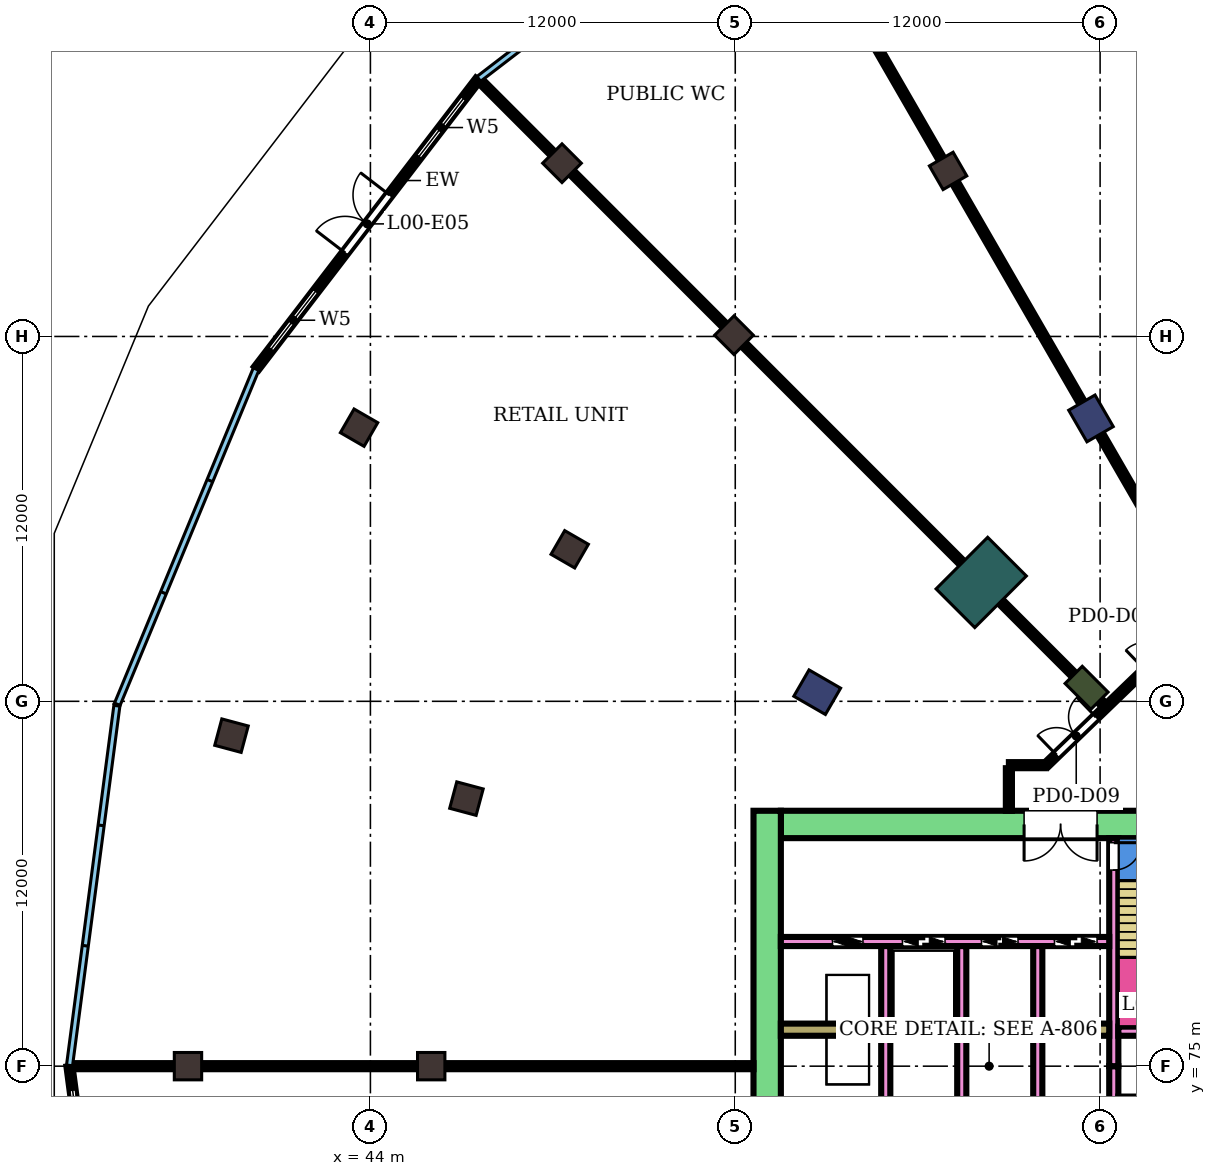
"""IFC4 building model, lengths in metres.
Left out: names, types, materials, properties, quantities, classifications, styles, units other than length and angle.
Written with IfcOpenShell. Run it as: python <this file> out.ifc"""

import sys

from ifc_helpers import new_model, si_unit, direction, frame, frame_2d, origin, origin_2d, place, context, subcontext, project, spatial, rectangle, extrude, element, fill, save


model = new_model("IFC4")
c1 = context("Model", 3, precision=1e-05, world=origin(), true_north=direction((0.0, 1.0)))
c2 = subcontext(c1, "Body", "Model", "MODEL_VIEW")
j1 = project(units=[si_unit("LENGTHUNIT", "METRE"), si_unit("PLANEANGLEUNIT", "RADIAN")], contexts=[c1])
p1 = place(None, origin())
s1 = spatial("IfcSite", under=j1, at=p1, CompositionType="ELEMENT")
p2 = place(p1, origin())
s2 = spatial("IfcBuilding", under=s1, at=p2, CompositionType="ELEMENT")
p3 = place(p2, origin())
s3 = spatial("IfcBuildingStorey", under=s2, at=p3, CompositionType="ELEMENT", Elevation=0.0)
for number, where, z_axis, x_axis in (
    (1, (50.302, 104.698, 0.0), (0.0, 0.0, 1.0), (-0.707, 0.707, 0.0)),
    (2, (43.627, 96.0, 0.0), (0.0, 0.0, 1.0), (-0.866, 0.5, 0.0)),
    (3, (39.431, 85.87, 0.0), (0.0, 0.0, 1.0), (-0.966, 0.259, 0.0)),
    (4, (38.0, 75.0, 0.0), (0.0, 0.0, 1.0), (-1.0, 0.0, 0.0)),
    (5, (63.0, 104.445, 0.0), (0.0, 0.0, 1.0), (-0.5, 0.866, 0.0)),
    (6, (55.958, 99.042, 0.0), (0.0, 0.0, 1.0), (-0.707, 0.707, 0.0)),
    (7, (50.555, 92.0, 0.0), (0.0, 0.0, 1.0), (-0.866, 0.5, 0.0)),
    (8, (47.158, 83.8, 0.0), (0.0, 0.0, 1.0), (-0.966, 0.259, 0.0)),
    (9, (46.0, 75.0, 0.0), (0.0, 0.0, 1.0), (-1.0, 0.0, 0.0)),
):
    element("IfcColumn", number, at=place(p3, frame(where, z_axis=z_axis, x_axis=x_axis)), inside=s3, PredefinedType="COLUMN", context=c2, shape_type="SweptSolid", body=[
        extrude(rectangle(XDim=0.9, YDim=0.9, at=origin_2d()), origin(), (0.0, 0.0, 1.0), 7.0),
    ])
for number, where, z_axis, x_axis in (
    (10, (67.7, 96.304, 0.0), (0.0, 0.0, 1.0), (-0.5, 0.866, 0.0)),
    (11, (58.696, 87.3, 0.0), (0.0, 0.0, 1.0), (-0.866, 0.5, 0.0)),
):
    element("IfcColumn", number, at=place(p3, frame(where, z_axis=z_axis, x_axis=x_axis)), inside=s3, PredefinedType="COLUMN", context=c2, shape_type="SweptSolid", body=[
        extrude(rectangle(XDim=1.2, YDim=1.0, at=origin_2d()), origin(), (0.0, 0.0, 1.0), 7.0),
    ])
p4 = place(p3, frame((67.555, 87.445, 0.0), z_axis=(0.0, 0.0, 1.0), x_axis=(-0.707106781187, 0.707106781187, 0.0)))
e12 = element("IfcColumn", 12, at=p4, inside=s3, PredefinedType="COLUMN", context=c2, shape_type="SweptSolid", body=[
    extrude(rectangle(XDim=1.2, YDim=0.8, at=origin_2d()), origin(), (0.0, 0.0, 1.0), 7.0),
])
p5 = place(p3, frame((64.09, 90.91, 0.0), z_axis=(0.0, 0.0, 1.0), x_axis=(-0.707106781187, 0.707106781187, 0.0)))
e13 = element("IfcColumn", 13, at=p5, inside=s3, PredefinedType="COLUMN", context=c2, shape_type="SweptSolid", body=[
    extrude(rectangle(XDim=1.8, YDim=2.4, at=origin_2d()), origin(), (0.0, 0.0, 1.0), 7.0),
])
p6 = place(p3, frame((72.1, 82.95, 0.0), z_axis=(0.0, 0.0, 1.0), x_axis=(-1.0, 0.0, 0.0)))
e14 = element("IfcWall", 14, at=p6, inside=s3, PredefinedType="SHEAR", context=c2, shape_type="SweptSolid", body=[
    extrude(rectangle(XDim=14.6, YDim=0.9, at=frame_2d((7.3, 0.0))), origin(), (0.0, 0.0, 1.0), 6.55),
])
p7 = place(p6, frame((4.2, 0.0, 0.0)))
e15 = element("IfcOpeningElement", 15, at=p7, cuts=e14, PredefinedType="OPENING", context=c2, shape_type="SweptSolid", body=[
    extrude(rectangle(XDim=2.4, YDim=2.4, at=frame_2d((1.2, 1.2))), frame((0.0, 0.46, 0.0), z_axis=(0.0, -1.0, 0.0), x_axis=(1.0, 0.0, 0.0)), (0.0, 0.0, 1.0), 0.92),
])
p8 = place(p3, frame((57.05, 83.4, 0.0), z_axis=(0.0, 0.0, 1.0), x_axis=(0.0, -1.0, 0.0)))
e16 = element("IfcWall", 16, at=p8, inside=s3, PredefinedType="SHEAR", context=c2, shape_type="SweptSolid", body=[
    extrude(rectangle(XDim=16.8, YDim=0.9, at=frame_2d((8.4, 0.0))), origin(), (0.0, 0.0, 1.0), 6.55),
])
p9 = place(p3, frame((68.45, 75.0, 0.0), z_axis=(0.0, 0.0, 1.0), x_axis=(0.0, -1.0, 0.0)))
e17 = element("IfcWall", 17, at=p9, inside=s3, PredefinedType="SHEAR", context=c2, shape_type="SweptSolid", body=[
    extrude(rectangle(XDim=7.5, YDim=0.3, at=frame_2d((3.75, 0.0))), origin(), (0.0, 0.0, 1.0), 6.55),
])
p10 = place(p9, frame((1.85, 0.0, 0.0)))
e18 = element("IfcOpeningElement", 18, at=p10, cuts=e17, PredefinedType="OPENING", context=c2, shape_type="SweptSolid", body=[
    extrude(rectangle(XDim=0.9, YDim=2.1, at=frame_2d((0.45, 1.05))), frame((0.0, 0.16, 0.0), z_axis=(0.0, -1.0, 0.0), x_axis=(1.0, 0.0, 0.0)), (0.0, 0.0, 1.0), 0.32),
])
p11 = place(p3, frame((68.45, 82.5, 0.0), z_axis=(0.0, 0.0, 1.0), x_axis=(0.0, -1.0, 0.0)))
e19 = element("IfcWall", 19, at=p11, inside=s3, PredefinedType="SHEAR", context=c2, shape_type="SweptSolid", body=[
    extrude(rectangle(XDim=7.5, YDim=0.3, at=frame_2d((3.75, 0.0))), origin(), (0.0, 0.0, 1.0), 6.55),
])
p12 = place(p11, frame((0.15, 0.0, 0.0)))
e20 = element("IfcOpeningElement", 20, at=p12, cuts=e19, PredefinedType="OPENING", context=c2, shape_type="SweptSolid", body=[
    extrude(rectangle(XDim=0.9, YDim=2.1, at=frame_2d((0.45, 1.05))), frame((0.0, 0.16, 0.0), z_axis=(0.0, -1.0, 0.0), x_axis=(1.0, 0.0, 0.0)), (0.0, 0.0, 1.0), 0.32),
])
p13 = place(p3, frame((71.65, 73.85, 0.0), z_axis=(0.0, 0.0, 1.0), x_axis=(-1.0, 0.0, 0.0)))
e21 = element("IfcWall", 21, at=p13, inside=s3, PredefinedType="SHEAR", context=c2, shape_type="SweptSolid", body=[
    extrude(rectangle(XDim=3.05, YDim=0.3, at=frame_2d((1.525, 0.0))), origin(), (0.0, 0.0, 1.0), 6.55),
])
p14 = place(p13, frame((1.1, 0.0, 0.0)))
e22 = element("IfcOpeningElement", 22, at=p14, cuts=e21, PredefinedType="OPENING", context=c2, shape_type="SweptSolid", body=[
    extrude(rectangle(XDim=0.7, YDim=2.0, at=frame_2d((0.35, 1.0))), frame((0.0, 0.16, 0.0), z_axis=(0.0, -1.0, 0.0), x_axis=(1.0, 0.0, 0.0)), (0.0, 0.0, 1.0), 0.32),
])
p15 = place(p3, frame((71.65, 76.15, 0.0), z_axis=(0.0, 0.0, 1.0), x_axis=(-1.0, 0.0, 0.0)))
e23 = element("IfcWall", 23, at=p15, inside=s3, PredefinedType="SHEAR", context=c2, shape_type="SweptSolid", body=[
    extrude(rectangle(XDim=3.05, YDim=0.3, at=frame_2d((1.525, 0.0))), origin(), (0.0, 0.0, 1.0), 6.55),
])
p16 = place(p3, frame((68.3, 76.2, 0.0), z_axis=(0.0, 0.0, 1.0), x_axis=(-1.0, 0.0, 0.0)))
e24 = element("IfcWall", 24, at=p16, inside=s3, PredefinedType="SHEAR", context=c2, shape_type="SweptSolid", body=[
    extrude(rectangle(XDim=10.8, YDim=0.4, at=frame_2d((5.4, 0.0))), origin(), (0.0, 0.0, 1.0), 6.55),
])
p17 = place(p3, frame((68.3, 79.1, 0.0), z_axis=(0.0, 0.0, 1.0), x_axis=(-1.0, 0.0, 0.0)))
e25 = element("IfcWall", 25, at=p17, inside=s3, PredefinedType="SHEAR", context=c2, shape_type="SweptSolid", body=[
    extrude(rectangle(XDim=10.8, YDim=0.3, at=frame_2d((5.4, 0.0))), origin(), (0.0, 0.0, 1.0), 6.55),
])
p18 = place(p17, frame((0.4, 0.0, 0.0)))
e26 = element("IfcOpeningElement", 26, at=p18, cuts=e25, PredefinedType="OPENING", context=c2, shape_type="SweptSolid", body=[
    extrude(rectangle(XDim=1.4, YDim=2.1, at=frame_2d((0.7, 1.05))), frame((0.0, 0.16, 0.0), z_axis=(0.0, -1.0, 0.0), x_axis=(1.0, 0.0, 0.0)), (0.0, 0.0, 1.0), 0.32),
])
p19 = place(p17, frame((3.0, 0.0, 0.0)))
e27 = element("IfcOpeningElement", 27, at=p19, cuts=e25, PredefinedType="OPENING", context=c2, shape_type="SweptSolid", body=[
    extrude(rectangle(XDim=1.2, YDim=2.1, at=frame_2d((0.6, 1.05))), frame((0.0, 0.16, 0.0), z_axis=(0.0, -1.0, 0.0), x_axis=(1.0, 0.0, 0.0)), (0.0, 0.0, 1.0), 0.32),
])
p20 = place(p17, frame((5.4, 0.0, 0.0)))
e28 = element("IfcOpeningElement", 28, at=p20, cuts=e25, PredefinedType="OPENING", context=c2, shape_type="SweptSolid", body=[
    extrude(rectangle(XDim=1.4, YDim=2.1, at=frame_2d((0.7, 1.05))), frame((0.0, 0.16, 0.0), z_axis=(0.0, -1.0, 0.0), x_axis=(1.0, 0.0, 0.0)), (0.0, 0.0, 1.0), 0.32),
])
p21 = place(p17, frame((8.1, 0.0, 0.0)))
e29 = element("IfcOpeningElement", 29, at=p21, cuts=e25, PredefinedType="OPENING", context=c2, shape_type="SweptSolid", body=[
    extrude(rectangle(XDim=1.0, YDim=2.1, at=frame_2d((0.5, 1.05))), frame((0.0, 0.16, 0.0), z_axis=(0.0, -1.0, 0.0), x_axis=(1.0, 0.0, 0.0)), (0.0, 0.0, 1.0), 0.32),
])
for number, where, z_axis, x_axis in (
    (30, (65.95, 76.0, 0.0), (0.0, 0.0, 1.0), (0.0, -1.0, 0.0)),
    (31, (63.45, 76.0, 0.0), (0.0, 0.0, 1.0), (0.0, -1.0, 0.0)),
    (32, (60.95, 76.0, 0.0), (0.0, 0.0, 1.0), (0.0, -1.0, 0.0)),
    (33, (65.95, 78.95, 0.0), (0.0, 0.0, 1.0), (0.0, -1.0, 0.0)),
    (34, (63.45, 78.95, 0.0), (0.0, 0.0, 1.0), (0.0, -1.0, 0.0)),
    (35, (60.95, 78.95, 0.0), (0.0, 0.0, 1.0), (0.0, -1.0, 0.0)),
):
    element("IfcWall", number, at=place(p3, frame(where, z_axis=z_axis, x_axis=x_axis)), inside=s3, PredefinedType="SHEAR", context=c2, shape_type="SweptSolid", body=[
        extrude(rectangle(XDim=2.55, YDim=0.3, at=frame_2d((1.275, 0.0))), origin(), (0.0, 0.0, 1.0), 6.55),
    ])
p22 = place(p3, frame((47.544, 107.456, 0.0), z_axis=(0.0, 0.0, 1.0), x_axis=(-0.608756159021, -0.793357384068, 0.0)))
e36 = element("IfcWall", 36, at=p22, inside=s3, PredefinedType="NOTDEFINED", context=c2, shape_type="SweptSolid", body=[
    extrude(rectangle(XDim=11.982, YDim=0.2, at=frame_2d((5.991, 0.0))), origin(), (0.0, 0.0, 1.0), 7.0),
])
p23 = place(p22, frame((0.797, 0.0, 0.9)))
e37 = element("IfcOpeningElement", 37, at=p23, cuts=e36, PredefinedType="OPENING", context=c2, shape_type="SweptSolid", body=[
    extrude(rectangle(XDim=2.4, YDim=3.6, at=frame_2d((1.2, 1.8))), frame((0.0, 0.11, 0.0), z_axis=(0.0, -1.0, 0.0), x_axis=(1.0, 0.0, 0.0)), (0.0, 0.0, 1.0), 0.22),
])
p24 = place(p22, frame((4.791, 0.0, 0.0)))
e38 = element("IfcOpeningElement", 38, at=p24, cuts=e36, PredefinedType="OPENING", context=c2, shape_type="SweptSolid", body=[
    extrude(rectangle(XDim=2.4, YDim=2.7, at=frame_2d((1.2, 1.35))), frame((0.0, 0.11, 0.0), z_axis=(0.0, -1.0, 0.0), x_axis=(1.0, 0.0, 0.0)), (0.0, 0.0, 1.0), 0.22),
])
p25 = place(p22, frame((8.785, 0.0, 0.9)))
e39 = element("IfcOpeningElement", 39, at=p25, cuts=e36, PredefinedType="OPENING", context=c2, shape_type="SweptSolid", body=[
    extrude(rectangle(XDim=2.4, YDim=3.6, at=frame_2d((1.2, 1.8))), frame((0.0, 0.11, 0.0), z_axis=(0.0, -1.0, 0.0), x_axis=(1.0, 0.0, 0.0)), (0.0, 0.0, 1.0), 0.22),
])
p26 = place(p3, frame((34.101, 75.0, 0.0), z_axis=(0.0, 0.0, 1.0), x_axis=(0.130524612391, -0.991445069361, 0.0)))
e40 = element("IfcWall", 40, at=p26, inside=s3, PredefinedType="NOTDEFINED", context=c2, shape_type="SweptSolid", body=[
    extrude(rectangle(XDim=11.982, YDim=0.2, at=frame_2d((5.991, 0.0))), origin(), (0.0, 0.0, 1.0), 7.0),
])
p27 = place(p26, frame((0.797, 0.0, 0.9)))
e41 = element("IfcOpeningElement", 41, at=p27, cuts=e40, PredefinedType="OPENING", context=c2, shape_type="SweptSolid", body=[
    extrude(rectangle(XDim=2.4, YDim=3.6, at=frame_2d((1.2, 1.8))), frame((0.0, 0.11, 0.0), z_axis=(0.0, -1.0, 0.0), x_axis=(1.0, 0.0, 0.0)), (0.0, 0.0, 1.0), 0.22),
])
p28 = place(p26, frame((4.791, 0.0, 0.0)))
e42 = element("IfcOpeningElement", 42, at=p28, cuts=e40, PredefinedType="OPENING", context=c2, shape_type="SweptSolid", body=[
    extrude(rectangle(XDim=2.4, YDim=2.7, at=frame_2d((1.2, 1.35))), frame((0.0, 0.11, 0.0), z_axis=(0.0, -1.0, 0.0), x_axis=(1.0, 0.0, 0.0)), (0.0, 0.0, 1.0), 0.22),
])
p29 = place(p26, frame((8.785, 0.0, 0.9)))
e43 = element("IfcOpeningElement", 43, at=p29, cuts=e40, PredefinedType="OPENING", context=c2, shape_type="SweptSolid", body=[
    extrude(rectangle(XDim=2.4, YDim=3.6, at=frame_2d((1.2, 1.8))), frame((0.0, 0.11, 0.0), z_axis=(0.0, -1.0, 0.0), x_axis=(1.0, 0.0, 0.0)), (0.0, 0.0, 1.0), 0.22),
])
p30 = place(p3, frame((34.203, 75.0, 0.0), z_axis=(0.0, 0.0, 1.0), x_axis=(1.0, 0.0, 0.0)))
e44 = element("IfcWall", 44, at=p30, inside=s3, PredefinedType="PARTITIONING", context=c2, shape_type="SweptSolid", body=[
    extrude(rectangle(XDim=22.396, YDim=0.2, at=frame_2d((11.198, 0.0))), origin(), (0.0, 0.0, 1.0), 5.65),
])
p31 = place(p3, frame((47.623, 107.392, 0.0), z_axis=(0.0, 0.0, 1.0), x_axis=(0.70693841041, -0.707275111882, 0.0)))
e45 = element("IfcWall", 45, at=p31, inside=s3, PredefinedType="PARTITIONING", context=c2, shape_type="SweptSolid", body=[
    extrude(rectangle(XDim=29.004, YDim=0.2, at=frame_2d((14.502, 0.0))), origin(), (0.0, 0.0, 1.0), 5.65),
])
p32 = place(p3, frame((57.107, 114.666, 0.0), z_axis=(0.0, 0.0, 1.0), x_axis=(0.499851749166, -0.866110979526, 0.0)))
e46 = element("IfcWall", 46, at=p32, inside=s3, PredefinedType="PARTITIONING", context=c2, shape_type="SweptSolid", body=[
    extrude(rectangle(XDim=28.496, YDim=0.2, at=frame_2d((14.248, 0.0))), origin(), (0.0, 0.0, 1.0), 5.65),
])
p33 = place(p3, frame((65.0, 83.401, 0.0), z_axis=(0.0, 0.0, 1.0), x_axis=(0.0, 1.0, 0.0)))
e47 = element("IfcWall", 47, at=p33, inside=s3, PredefinedType="PARTITIONING", context=c2, shape_type="SweptSolid", body=[
    extrude(rectangle(XDim=1.399, YDim=0.2, at=frame_2d((0.7, 0.0))), origin(), (0.0, 0.0, 1.0), 6.55),
])
p34 = place(p3, frame((65.0, 84.9, 0.0), z_axis=(0.0, 0.0, 1.0), x_axis=(1.0, 0.0, 0.0)))
e48 = element("IfcWall", 48, at=p34, inside=s3, PredefinedType="PARTITIONING", context=c2, shape_type="SweptSolid", body=[
    extrude(rectangle(XDim=1.16, YDim=0.2, at=frame_2d((0.58, 0.0))), origin(), (0.0, 0.0, 1.0), 6.55),
])
p35 = place(p3, frame((66.22, 84.9, 0.0), z_axis=(0.0, 0.0, 1.0), x_axis=(0.719621348931, 0.694366700068, 0.0)))
e49 = element("IfcWall", 49, at=p35, inside=s3, PredefinedType="PARTITIONING", context=c2, shape_type="SweptSolid", body=[
    extrude(rectangle(XDim=7.173, YDim=0.2, at=frame_2d((3.586, 0.0))), origin(), (0.0, 0.0, 1.0), 6.05),
])
p36 = place(p35, frame((4.519, 0.0, 0.0)))
e50 = element("IfcOpeningElement", 50, at=p36, cuts=e49, PredefinedType="OPENING", context=c2, shape_type="SweptSolid", body=[
    extrude(rectangle(XDim=0.9, YDim=2.1, at=frame_2d((0.45, 1.05))), frame((0.0, 0.11, 0.0), z_axis=(0.0, -1.0, 0.0), x_axis=(1.0, 0.0, 0.0)), (0.0, 0.0, 1.0), 0.22),
])
p37 = place(p35, frame((0.482, 0.0, 0.0)))
e51 = element("IfcOpeningElement", 51, at=p37, cuts=e49, PredefinedType="OPENING", context=c2, shape_type="SweptSolid", body=[
    extrude(rectangle(XDim=1.8, YDim=2.1, at=frame_2d((0.9, 1.05))), frame((0.0, 0.11, 0.0), z_axis=(0.0, -1.0, 0.0), x_axis=(1.0, 0.0, 0.0)), (0.0, 0.0, 1.0), 0.22),
])
p38 = place(p3, frame((68.151, 119.238, 0.0), z_axis=(0.0, 0.0, 1.0), x_axis=(0.258758470918, -0.965942055057, 0.0)))
e52 = element("IfcWall", 52, at=p38, inside=s3, PredefinedType="PARTITIONING", context=c2, shape_type="SweptSolid", body=[
    extrude(rectangle(XDim=29.074, YDim=0.2, at=frame_2d((14.537, 0.0))), origin(), (0.0, 0.0, 1.0), 5.65),
])
p39 = place(p23, origin())
e53 = element("IfcWindow", 53, at=p39, inside=s3, PartitioningType="SINGLE_PANEL", PredefinedType="WINDOW", context=c2, shape_type="SweptSolid", body=[
    extrude(rectangle(XDim=2.4, YDim=3.6, at=frame_2d((1.2, 1.8))), frame((0.0, 0.03, 0.0), z_axis=(0.0, -1.0, 0.0), x_axis=(1.0, 0.0, 0.0)), (0.0, 0.0, 1.0), 0.06),
])
fill(e37, e53)
p40 = place(p24, frame((2.4, 0.0, 0.0), z_axis=(0.0, 0.0, 1.0), x_axis=(-1.0, 0.0, 0.0)))
e54 = element("IfcDoor", 54, at=p40, inside=s3, OperationType="DOUBLE_DOOR_SINGLE_SWING", PredefinedType="DOOR", context=c2, shape_type="SweptSolid", body=[
    extrude(rectangle(XDim=2.4, YDim=2.7, at=frame_2d((1.2, 1.35))), frame((0.0, 0.025, 0.0), z_axis=(0.0, -1.0, 0.0), x_axis=(1.0, 0.0, 0.0)), (0.0, 0.0, 1.0), 0.05),
])
fill(e38, e54)
p41 = place(p25, origin())
e55 = element("IfcWindow", 55, at=p41, inside=s3, PartitioningType="SINGLE_PANEL", PredefinedType="WINDOW", context=c2, shape_type="SweptSolid", body=[
    extrude(rectangle(XDim=2.4, YDim=3.6, at=frame_2d((1.2, 1.8))), frame((0.0, 0.03, 0.0), z_axis=(0.0, -1.0, 0.0), x_axis=(1.0, 0.0, 0.0)), (0.0, 0.0, 1.0), 0.06),
])
fill(e39, e55)
p42 = place(p27, origin())
e56 = element("IfcWindow", 56, at=p42, inside=s3, PartitioningType="SINGLE_PANEL", PredefinedType="WINDOW", context=c2, shape_type="SweptSolid", body=[
    extrude(rectangle(XDim=2.4, YDim=3.6, at=frame_2d((1.2, 1.8))), frame((0.0, 0.03, 0.0), z_axis=(0.0, -1.0, 0.0), x_axis=(1.0, 0.0, 0.0)), (0.0, 0.0, 1.0), 0.06),
])
fill(e41, e56)
p43 = place(p37, origin())
e57 = element("IfcDoor", 57, at=p43, inside=s3, OperationType="DOUBLE_DOOR_SINGLE_SWING", PredefinedType="DOOR", context=c2, shape_type="SweptSolid", body=[
    extrude(rectangle(XDim=1.8, YDim=2.1, at=frame_2d((0.9, 1.05))), frame((0.0, 0.025, 0.0), z_axis=(0.0, -1.0, 0.0), x_axis=(1.0, 0.0, 0.0)), (0.0, 0.0, 1.0), 0.05),
])
fill(e51, e57)
p44 = place(p12, origin())
e58 = element("IfcDoor", 58, at=p44, inside=s3, OperationType="SINGLE_SWING_LEFT", PredefinedType="DOOR", context=c2, shape_type="SweptSolid", body=[
    extrude(rectangle(XDim=0.9, YDim=2.1, at=frame_2d((0.45, 1.05))), frame((0.0, 0.025, 0.0), z_axis=(0.0, -1.0, 0.0), x_axis=(1.0, 0.0, 0.0)), (0.0, 0.0, 1.0), 0.05),
])
fill(e20, e58)
p45 = place(p18, origin())
e59 = element("IfcDoor", 59, at=p45, inside=s3, OperationType="DOUBLE_DOOR_SLIDING", PredefinedType="DOOR", context=c2, shape_type="SweptSolid", body=[
    extrude(rectangle(XDim=1.4, YDim=2.1, at=frame_2d((0.7, 1.05))), frame((0.0, 0.025, 0.0), z_axis=(0.0, -1.0, 0.0), x_axis=(1.0, 0.0, 0.0)), (0.0, 0.0, 1.0), 0.05),
])
fill(e26, e59)
p46 = place(p19, origin())
e60 = element("IfcDoor", 60, at=p46, inside=s3, OperationType="DOUBLE_DOOR_SLIDING", PredefinedType="DOOR", context=c2, shape_type="SweptSolid", body=[
    extrude(rectangle(XDim=1.2, YDim=2.1, at=frame_2d((0.6, 1.05))), frame((0.0, 0.025, 0.0), z_axis=(0.0, -1.0, 0.0), x_axis=(1.0, 0.0, 0.0)), (0.0, 0.0, 1.0), 0.05),
])
fill(e27, e60)
p47 = place(p20, origin())
e61 = element("IfcDoor", 61, at=p47, inside=s3, OperationType="DOUBLE_DOOR_SLIDING", PredefinedType="DOOR", context=c2, shape_type="SweptSolid", body=[
    extrude(rectangle(XDim=1.4, YDim=2.1, at=frame_2d((0.7, 1.05))), frame((0.0, 0.025, 0.0), z_axis=(0.0, -1.0, 0.0), x_axis=(1.0, 0.0, 0.0)), (0.0, 0.0, 1.0), 0.05),
])
fill(e28, e61)
p48 = place(p21, origin())
e62 = element("IfcDoor", 62, at=p48, inside=s3, OperationType="DOUBLE_DOOR_SLIDING", PredefinedType="DOOR", context=c2, shape_type="SweptSolid", body=[
    extrude(rectangle(XDim=1.0, YDim=2.1, at=frame_2d((0.5, 1.05))), frame((0.0, 0.025, 0.0), z_axis=(0.0, -1.0, 0.0), x_axis=(1.0, 0.0, 0.0)), (0.0, 0.0, 1.0), 0.05),
])
fill(e29, e62)
p49 = place(p7, origin())
e63 = element("IfcDoor", 63, at=p49, inside=s3, OperationType="DOUBLE_DOOR_SINGLE_SWING", PredefinedType="DOOR", context=c2, shape_type="SweptSolid", body=[
    extrude(rectangle(XDim=2.4, YDim=2.4, at=frame_2d((1.2, 1.2))), frame((0.0, 0.025, 0.0), z_axis=(0.0, -1.0, 0.0), x_axis=(1.0, 0.0, 0.0)), (0.0, 0.0, 1.0), 0.05),
])
fill(e15, e63)
save(model, sys.argv[1])
